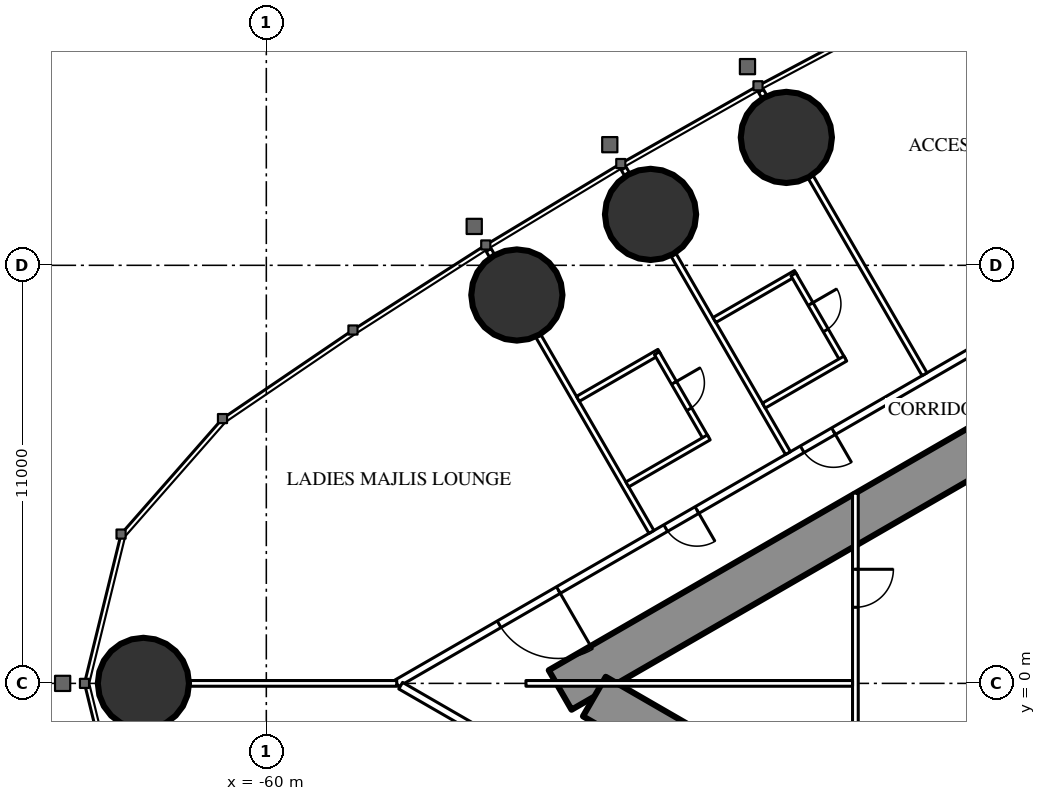
"""IFC4 building model, lengths in metres.
Left out: names, types, materials, properties, quantities, classifications, styles, units other than length and angle.
Written with IfcOpenShell. Run it as: python <this file> out.ifc"""

import sys

from ifc_helpers import new_model, si_unit, direction, frame, frame_2d, origin, origin_2d, place, context, subcontext, project, spatial, rectangle, circle, extrude, element, fill, save


model = new_model("IFC4")
c1 = context("Model", 3, precision=1e-05, world=origin(), true_north=direction((0.0, 1.0)))
c2 = subcontext(c1, "Body", "Model", "MODEL_VIEW")
j1 = project(units=[si_unit("LENGTHUNIT", "METRE"), si_unit("PLANEANGLEUNIT", "RADIAN")], contexts=[c1])
p1 = place(None, origin())
s1 = spatial("IfcSite", under=j1, at=p1, CompositionType="ELEMENT")
p2 = place(p1, origin())
s2 = spatial("IfcBuilding", under=s1, at=p2, CompositionType="ELEMENT")
p3 = place(p2, frame((0.0, 0.0, 244.1)))
s3 = spatial("IfcBuildingStorey", under=s2, at=p3, CompositionType="ELEMENT", Elevation=244.1)
for number, where, z_axis, x_axis in (
    (1, (-63.234, 0.0, 0.0), (0.0, 0.0, 1.0), (1.0, 0.0, 0.0)),
    (2, (-46.317, 14.365, 0.0), (0.0, 0.0, 1.0), (1.0, 0.0, 0.0)),
    (3, (-49.89, 12.34, 0.0), (0.0, 0.0, 1.0), (1.0, 0.0, 0.0)),
    (4, (-53.408, 10.219, 0.0), (0.0, 0.0, 1.0), (1.0, 0.0, 0.0)),
):
    element("IfcColumn", number, at=place(p3, frame(where, z_axis=z_axis, x_axis=x_axis)), inside=s3, PredefinedType="COLUMN", context=c2, shape_type="SweptSolid", body=[
        extrude(circle(Radius=1.2, at=origin_2d()), origin(), (0.0, 0.0, 1.0), 3.6),
    ])
p4 = place(p3, frame((-27.2, 14.3, 0.0), z_axis=(0.0, 0.0, 1.0), x_axis=(-0.866026593062, -0.499997940104, 0.0)))
e5 = element("IfcWall", 5, at=p4, inside=s3, PredefinedType="SHEAR", context=c2, shape_type="SweptSolid", body=[
    extrude(rectangle(XDim=28.946, YDim=1.2, at=frame_2d((14.473, 0.0))), origin(), (0.0, 0.0, 1.0), 3.6),
])
p5 = place(p4, frame((4.6, 0.0, 0.0)))
e6 = element("IfcOpeningElement", 6, at=p5, cuts=e5, PredefinedType="OPENING", context=c2, shape_type="SweptSolid", body=[
    extrude(rectangle(XDim=1.0, YDim=2.2, at=frame_2d((0.5, 1.1))), frame((0.0, 0.61, 0.0), z_axis=(0.0, -1.0, 0.0), x_axis=(1.0, 0.0, 0.0)), (0.0, 0.0, 1.0), 1.22),
])
p6 = place(p4, frame((13.395, 0.0, 0.0)))
e7 = element("IfcOpeningElement", 7, at=p6, cuts=e5, PredefinedType="OPENING", context=c2, shape_type="SweptSolid", body=[
    extrude(rectangle(XDim=1.8, YDim=2.2, at=frame_2d((0.9, 1.1))), frame((0.0, 0.61, 0.0), z_axis=(0.0, -1.0, 0.0), x_axis=(1.0, 0.0, 0.0)), (0.0, 0.0, 1.0), 1.22),
])
p7 = place(p3, frame((-27.2, -14.3, 0.0), z_axis=(0.0, 0.0, 1.0), x_axis=(-0.866024021859, 0.500002393557, 0.0)))
e8 = element("IfcWall", 8, at=p7, inside=s3, PredefinedType="SHEAR", context=c2, shape_type="SweptSolid", body=[
    extrude(rectangle(XDim=27.907, YDim=1.2, at=frame_2d((13.954, 0.0))), origin(), (0.0, 0.0, 1.0), 3.6),
])
p8 = place(p7, frame((4.6, 0.0, 0.0)))
e9 = element("IfcOpeningElement", 9, at=p8, cuts=e8, PredefinedType="OPENING", context=c2, shape_type="SweptSolid", body=[
    extrude(rectangle(XDim=1.0, YDim=2.2, at=frame_2d((0.5, 1.1))), frame((0.0, 0.61, 0.0), z_axis=(0.0, -1.0, 0.0), x_axis=(1.0, 0.0, 0.0)), (0.0, 0.0, 1.0), 1.22),
])
p9 = place(p7, frame((13.395, 0.0, 0.0)))
e10 = element("IfcOpeningElement", 10, at=p9, cuts=e8, PredefinedType="OPENING", context=c2, shape_type="SweptSolid", body=[
    extrude(rectangle(XDim=1.8, YDim=2.2, at=frame_2d((0.9, 1.1))), frame((0.0, 0.61, 0.0), z_axis=(0.0, -1.0, 0.0), x_axis=(1.0, 0.0, 0.0)), (0.0, 0.0, 1.0), 1.22),
])
p10 = place(p3, frame((-28.737, 16.068, 0.0), z_axis=(0.0, 0.0, 1.0), x_axis=(-0.866026057212, -0.499998868229, 0.0)))
e11 = element("IfcWall", 11, at=p10, inside=s3, PredefinedType="PARTITIONING", context=c2, shape_type="SweptSolid", body=[
    extrude(rectangle(XDim=32.137, YDim=0.2, at=frame_2d((16.068, 0.0))), origin(), (0.0, 0.0, 1.0), 3.35),
])
p11 = place(p10, frame((1.08, 0.0, 0.0)))
e12 = element("IfcOpeningElement", 12, at=p11, cuts=e11, PredefinedType="OPENING", context=c2, shape_type="SweptSolid", body=[
    extrude(rectangle(XDim=1.8, YDim=2.04, at=frame_2d((0.9, 1.02))), frame((0.0, 0.11, 0.0), z_axis=(0.0, -1.0, 0.0), x_axis=(1.0, 0.0, 0.0)), (0.0, 0.0, 1.0), 0.22),
])
p12 = place(p10, frame((6.86, 0.0, 0.0)))
e13 = element("IfcOpeningElement", 13, at=p12, cuts=e11, PredefinedType="OPENING", context=c2, shape_type="SweptSolid", body=[
    extrude(rectangle(XDim=1.0, YDim=2.2, at=frame_2d((0.5, 1.1))), frame((0.0, 0.11, 0.0), z_axis=(0.0, -1.0, 0.0), x_axis=(1.0, 0.0, 0.0)), (0.0, 0.0, 1.0), 0.22),
])
p13 = place(p10, frame((18.867, 0.0, 0.0)))
e14 = element("IfcOpeningElement", 14, at=p13, cuts=e11, PredefinedType="OPENING", context=c2, shape_type="SweptSolid", body=[
    extrude(rectangle(XDim=0.95, YDim=2.2, at=frame_2d((0.475, 1.1))), frame((0.0, 0.11, 0.0), z_axis=(0.0, -1.0, 0.0), x_axis=(1.0, 0.0, 0.0)), (0.0, 0.0, 1.0), 0.22),
])
p14 = place(p10, frame((23.015, 0.0, 0.0)))
e15 = element("IfcOpeningElement", 15, at=p14, cuts=e11, PredefinedType="OPENING", context=c2, shape_type="SweptSolid", body=[
    extrude(rectangle(XDim=0.95, YDim=2.2, at=frame_2d((0.475, 1.1))), frame((0.0, 0.11, 0.0), z_axis=(0.0, -1.0, 0.0), x_axis=(1.0, 0.0, 0.0)), (0.0, 0.0, 1.0), 0.22),
])
p15 = place(p10, frame((27.226, 0.0, 0.0)))
e16 = element("IfcOpeningElement", 16, at=p15, cuts=e11, PredefinedType="OPENING", context=c2, shape_type="SweptSolid", body=[
    extrude(rectangle(XDim=1.8, YDim=2.2, at=frame_2d((0.9, 1.1))), frame((0.0, 0.11, 0.0), z_axis=(0.0, -1.0, 0.0), x_axis=(1.0, 0.0, 0.0)), (0.0, 0.0, 1.0), 0.22),
])
p16 = place(p3, frame((-42.68, 8.134, 0.0), z_axis=(0.0, 0.0, 1.0), x_axis=(-0.499984479505, 0.866034364361, 0.0)))
e17 = element("IfcWall", 17, at=p16, inside=s3, PredefinedType="PARTITIONING", context=c2, shape_type="SweptSolid", body=[
    extrude(rectangle(XDim=5.995, YDim=0.15, at=frame_2d((2.998, 0.0))), origin(), (0.0, 0.0, 1.0), 2.45),
])
p17 = place(p3, frame((-46.898, 15.439, 0.0), z_axis=(0.0, 0.0, 1.0), x_axis=(-0.500232303069, 0.865891241997, 0.0)))
e18 = element("IfcWall", 18, at=p17, inside=s3, PredefinedType="PARTITIONING", context=c2, shape_type="SweptSolid", body=[
    extrude(rectangle(XDim=0.18, YDim=0.15, at=frame_2d((0.09, 0.0))), origin(), (0.0, 0.0, 1.0), 2.45),
])
p18 = place(p3, frame((-46.274, 6.059, 0.0), z_axis=(0.0, 0.0, 1.0), x_axis=(-0.500020471368, 0.866013584312, 0.0)))
e19 = element("IfcWall", 19, at=p18, inside=s3, PredefinedType="PARTITIONING", context=c2, shape_type="SweptSolid", body=[
    extrude(rectangle(XDim=6.028, YDim=0.15, at=frame_2d((3.014, 0.0))), origin(), (0.0, 0.0, 1.0), 2.45),
])
p19 = place(p3, frame((-50.508, 13.392, 0.0), z_axis=(0.0, 0.0, 1.0), x_axis=(-0.499644091975, 0.866230789891, 0.0)))
e20 = element("IfcWall", 20, at=p19, inside=s3, PredefinedType="PARTITIONING", context=c2, shape_type="SweptSolid", body=[
    extrude(rectangle(XDim=0.18, YDim=0.15, at=frame_2d((0.09, 0.0))), origin(), (0.0, 0.0, 1.0), 2.45),
])
p20 = place(p3, frame((-49.866, 3.985, 0.0), z_axis=(0.0, 0.0, 1.0), x_axis=(-0.500000694566, 0.866025002776, 0.0)))
e21 = element("IfcWall", 21, at=p20, inside=s3, PredefinedType="PARTITIONING", context=c2, shape_type="SweptSolid", body=[
    extrude(rectangle(XDim=5.95, YDim=0.15, at=frame_2d((2.975, 0.0))), origin(), (0.0, 0.0, 1.0), 2.45),
])
p21 = place(p3, frame((-54.061, 11.25, 0.0), z_axis=(0.0, 0.0, 1.0), x_axis=(-0.500391173478, 0.865799441849, 0.0)))
e22 = element("IfcWall", 22, at=p21, inside=s3, PredefinedType="PARTITIONING", context=c2, shape_type="SweptSolid", body=[
    extrude(rectangle(XDim=0.179, YDim=0.15, at=frame_2d((0.089, 0.0))), origin(), (0.0, 0.0, 1.0), 2.45),
])
p22 = place(p3, frame((-56.568, 0.0, 0.0), z_axis=(0.0, 0.0, 1.0), x_axis=(-1.0, 0.0, 0.0)))
e23 = element("IfcWall", 23, at=p22, inside=s3, PredefinedType="PARTITIONING", context=c2, shape_type="SweptSolid", body=[
    extrude(rectangle(XDim=5.446, YDim=0.15, at=frame_2d((2.723, 0.0))), origin(), (0.0, 0.0, 1.0), 2.45),
])
p23 = place(p3, frame((-44.715, -6.844, 0.0), z_axis=(0.0, 0.0, 1.0), x_axis=(-0.866025261224, 0.500000246922, 0.0)))
e24 = element("IfcWall", 24, at=p23, inside=s3, PredefinedType="PARTITIONING", context=c2, shape_type="SweptSolid", body=[
    extrude(rectangle(XDim=13.567, YDim=0.2, at=frame_2d((6.783, 0.0))), origin(), (0.0, 0.0, 1.0), 3.35),
])
p24 = place(p23, frame((8.716, 0.0, 0.0)))
e25 = element("IfcOpeningElement", 25, at=p24, cuts=e24, PredefinedType="OPENING", context=c2, shape_type="SweptSolid", body=[
    extrude(rectangle(XDim=1.8, YDim=2.2, at=frame_2d((0.9, 1.1))), frame((0.0, 0.11, 0.0), z_axis=(0.0, -1.0, 0.0), x_axis=(1.0, 0.0, 0.0)), (0.0, 0.0, 1.0), 0.22),
])
p25 = place(p23, frame((4.565, 0.0, 0.0)))
e26 = element("IfcOpeningElement", 26, at=p25, cuts=e24, PredefinedType="OPENING", context=c2, shape_type="SweptSolid", body=[
    extrude(rectangle(XDim=0.95, YDim=2.2, at=frame_2d((0.475, 1.1))), frame((0.0, 0.11, 0.0), z_axis=(0.0, -1.0, 0.0), x_axis=(1.0, 0.0, 0.0)), (0.0, 0.0, 1.0), 0.22),
])
p26 = place(p23, frame((0.5, 0.0, 0.0)))
e27 = element("IfcOpeningElement", 27, at=p26, cuts=e24, PredefinedType="OPENING", context=c2, shape_type="SweptSolid", body=[
    extrude(rectangle(XDim=0.967, YDim=2.2, at=frame_2d((0.483, 1.1))), frame((0.0, 0.11, 0.0), z_axis=(0.0, -1.0, 0.0), x_axis=(1.0, 0.0, 0.0)), (0.0, 0.0, 1.0), 0.22),
])
p27 = place(p3, frame((-46.065, 10.798, 0.0), z_axis=(0.0, 0.0, 1.0), x_axis=(-0.866031185235, -0.4999899861, 0.0)))
e28 = element("IfcWall", 28, at=p27, inside=s3, PredefinedType="PARTITIONING", context=c2, shape_type="SweptSolid", body=[
    extrude(rectangle(XDim=2.475, YDim=0.15, at=frame_2d((1.238, 0.0))), origin(), (0.0, 0.0, 1.0), 3.35),
])
p28 = place(p3, frame((-44.83, 8.509, 0.0), z_axis=(0.0, 0.0, 1.0), x_axis=(-0.499936506574, 0.866062058628, 0.0)))
e29 = element("IfcWall", 29, at=p28, inside=s3, PredefinedType="PARTITIONING", context=c2, shape_type="SweptSolid", body=[
    extrude(rectangle(XDim=2.6, YDim=0.15, at=frame_2d((1.3, 0.0))), origin(), (0.0, 0.0, 1.0), 3.35),
])
p29 = place(p28, frame((0.9, 0.0, 0.0)))
e30 = element("IfcOpeningElement", 30, at=p29, cuts=e29, PredefinedType="OPENING", context=c2, shape_type="SweptSolid", body=[
    extrude(rectangle(XDim=0.8, YDim=2.2, at=frame_2d((0.4, 1.1))), frame((0.0, 0.085, 0.0), z_axis=(0.0, -1.0, 0.0), x_axis=(1.0, 0.0, 0.0)), (0.0, 0.0, 1.0), 0.17),
])
p30 = place(p3, frame((-44.765, 8.546, 0.0), z_axis=(0.0, 0.0, 1.0), x_axis=(-0.86604923931, -0.499958713387, 0.0)))
e31 = element("IfcWall", 31, at=p30, inside=s3, PredefinedType="PARTITIONING", context=c2, shape_type="SweptSolid", body=[
    extrude(rectangle(XDim=2.475, YDim=0.15, at=frame_2d((1.237, 0.0))), origin(), (0.0, 0.0, 1.0), 3.35),
])
p31 = place(p3, frame((-49.658, 8.724, 0.0), z_axis=(0.0, 0.0, 1.0), x_axis=(-0.866031185235, -0.4999899861, 0.0)))
e32 = element("IfcWall", 32, at=p31, inside=s3, PredefinedType="PARTITIONING", context=c2, shape_type="SweptSolid", body=[
    extrude(rectangle(XDim=2.475, YDim=0.15, at=frame_2d((1.238, 0.0))), origin(), (0.0, 0.0, 1.0), 3.35),
])
p32 = place(p3, frame((-48.423, 6.435, 0.0), z_axis=(0.0, 0.0, 1.0), x_axis=(-0.500006934395, 0.866021400173, 0.0)))
e33 = element("IfcWall", 33, at=p32, inside=s3, PredefinedType="PARTITIONING", context=c2, shape_type="SweptSolid", body=[
    extrude(rectangle(XDim=2.6, YDim=0.15, at=frame_2d((1.3, 0.0))), origin(), (0.0, 0.0, 1.0), 3.35),
])
p33 = place(p32, frame((0.9, 0.0, 0.0)))
e34 = element("IfcOpeningElement", 34, at=p33, cuts=e33, PredefinedType="OPENING", context=c2, shape_type="SweptSolid", body=[
    extrude(rectangle(XDim=0.8, YDim=2.2, at=frame_2d((0.4, 1.1))), frame((0.0, 0.085, 0.0), z_axis=(0.0, -1.0, 0.0), x_axis=(1.0, 0.0, 0.0)), (0.0, 0.0, 1.0), 0.17),
])
p34 = place(p3, frame((-48.358, 6.472, 0.0), z_axis=(0.0, 0.0, 1.0), x_axis=(-0.866073894602, -0.499916002032, 0.0)))
e35 = element("IfcWall", 35, at=p34, inside=s3, PredefinedType="PARTITIONING", context=c2, shape_type="SweptSolid", body=[
    extrude(rectangle(XDim=2.475, YDim=0.15, at=frame_2d((1.238, 0.0))), origin(), (0.0, 0.0, 1.0), 3.35),
])
p35 = place(p3, frame((-44.5, 5.005, 0.0), z_axis=(0.0, 0.0, 1.0), x_axis=(0.0, -1.0, 0.0)))
e36 = element("IfcWall", 36, at=p35, inside=s3, PredefinedType="PARTITIONING", context=c2, shape_type="SweptSolid", body=[
    extrude(rectangle(XDim=10.009, YDim=0.15, at=frame_2d((5.005, 0.0))), origin(), (0.0, 0.0, 1.0), 2.5),
])
p36 = place(p35, frame((2.002, 0.0, 0.0)))
e37 = element("IfcOpeningElement", 37, at=p36, cuts=e36, PredefinedType="OPENING", context=c2, shape_type="SweptSolid", body=[
    extrude(rectangle(XDim=1.0, YDim=2.2, at=frame_2d((0.5, 1.1))), frame((0.0, 0.085, 0.0), z_axis=(0.0, -1.0, 0.0), x_axis=(1.0, 0.0, 0.0)), (0.0, 0.0, 1.0), 0.17),
])
p37 = place(p35, frame((7.007, 0.0, 0.0)))
e38 = element("IfcOpeningElement", 38, at=p37, cuts=e36, PredefinedType="OPENING", context=c2, shape_type="SweptSolid", body=[
    extrude(rectangle(XDim=1.0, YDim=2.2, at=frame_2d((0.5, 1.1))), frame((0.0, 0.085, 0.0), z_axis=(0.0, -1.0, 0.0), x_axis=(1.0, 0.0, 0.0)), (0.0, 0.0, 1.0), 0.17),
])
p38 = place(p3, frame((-44.575, 0.0, 0.0), z_axis=(0.0, 0.0, 1.0), x_axis=(-1.0, 0.0, 0.0)))
e39 = element("IfcWall", 39, at=p38, inside=s3, PredefinedType="PARTITIONING", context=c2, shape_type="SweptSolid", body=[
    extrude(rectangle(XDim=8.593, YDim=0.15, at=frame_2d((4.297, 0.0))), origin(), (0.0, 0.0, 1.0), 2.45),
])
p39 = place(p29, origin())
e40 = element("IfcDoor", 40, at=p39, inside=s3, OperationType="SINGLE_SWING_RIGHT", PredefinedType="DOOR", context=c2, shape_type="SweptSolid", body=[
    extrude(rectangle(XDim=0.8, YDim=2.2, at=frame_2d((0.4, 1.1))), frame((0.0, 0.025, 0.0), z_axis=(0.0, -1.0, 0.0), x_axis=(1.0, 0.0, 0.0)), (0.0, 0.0, 1.0), 0.05),
])
fill(e30, e40)
p40 = place(p13, origin())
e41 = element("IfcDoor", 41, at=p40, inside=s3, OperationType="SINGLE_SWING_LEFT", PredefinedType="DOOR", context=c2, shape_type="SweptSolid", body=[
    extrude(rectangle(XDim=0.95, YDim=2.2, at=frame_2d((0.475, 1.1))), frame((0.0, 0.025, 0.0), z_axis=(0.0, -1.0, 0.0), x_axis=(1.0, 0.0, 0.0)), (0.0, 0.0, 1.0), 0.05),
])
fill(e14, e41)
p41 = place(p33, origin())
e42 = element("IfcDoor", 42, at=p41, inside=s3, OperationType="SINGLE_SWING_RIGHT", PredefinedType="DOOR", context=c2, shape_type="SweptSolid", body=[
    extrude(rectangle(XDim=0.8, YDim=2.2, at=frame_2d((0.4, 1.1))), frame((0.0, 0.025, 0.0), z_axis=(0.0, -1.0, 0.0), x_axis=(1.0, 0.0, 0.0)), (0.0, 0.0, 1.0), 0.05),
])
fill(e34, e42)
p42 = place(p14, origin())
e43 = element("IfcDoor", 43, at=p42, inside=s3, OperationType="SINGLE_SWING_LEFT", PredefinedType="DOOR", context=c2, shape_type="SweptSolid", body=[
    extrude(rectangle(XDim=0.95, YDim=2.2, at=frame_2d((0.475, 1.1))), frame((0.0, 0.025, 0.0), z_axis=(0.0, -1.0, 0.0), x_axis=(1.0, 0.0, 0.0)), (0.0, 0.0, 1.0), 0.05),
])
fill(e15, e43)
p43 = place(p15, origin())
e44 = element("IfcDoor", 44, at=p43, inside=s3, OperationType="DOUBLE_DOOR_SINGLE_SWING", PredefinedType="DOOR", context=c2, shape_type="SweptSolid", body=[
    extrude(rectangle(XDim=1.8, YDim=2.2, at=frame_2d((0.9, 1.1))), frame((0.0, 0.025, 0.0), z_axis=(0.0, -1.0, 0.0), x_axis=(1.0, 0.0, 0.0)), (0.0, 0.0, 1.0), 0.05),
])
fill(e16, e44)
p44 = place(p36, origin())
e45 = element("IfcDoor", 45, at=p44, inside=s3, OperationType="SINGLE_SWING_LEFT", PredefinedType="DOOR", context=c2, shape_type="SweptSolid", body=[
    extrude(rectangle(XDim=1.0, YDim=2.2, at=frame_2d((0.5, 1.1))), frame((0.0, 0.025, 0.0), z_axis=(0.0, -1.0, 0.0), x_axis=(1.0, 0.0, 0.0)), (0.0, 0.0, 1.0), 0.05),
])
fill(e37, e45)
save(model, sys.argv[1])
